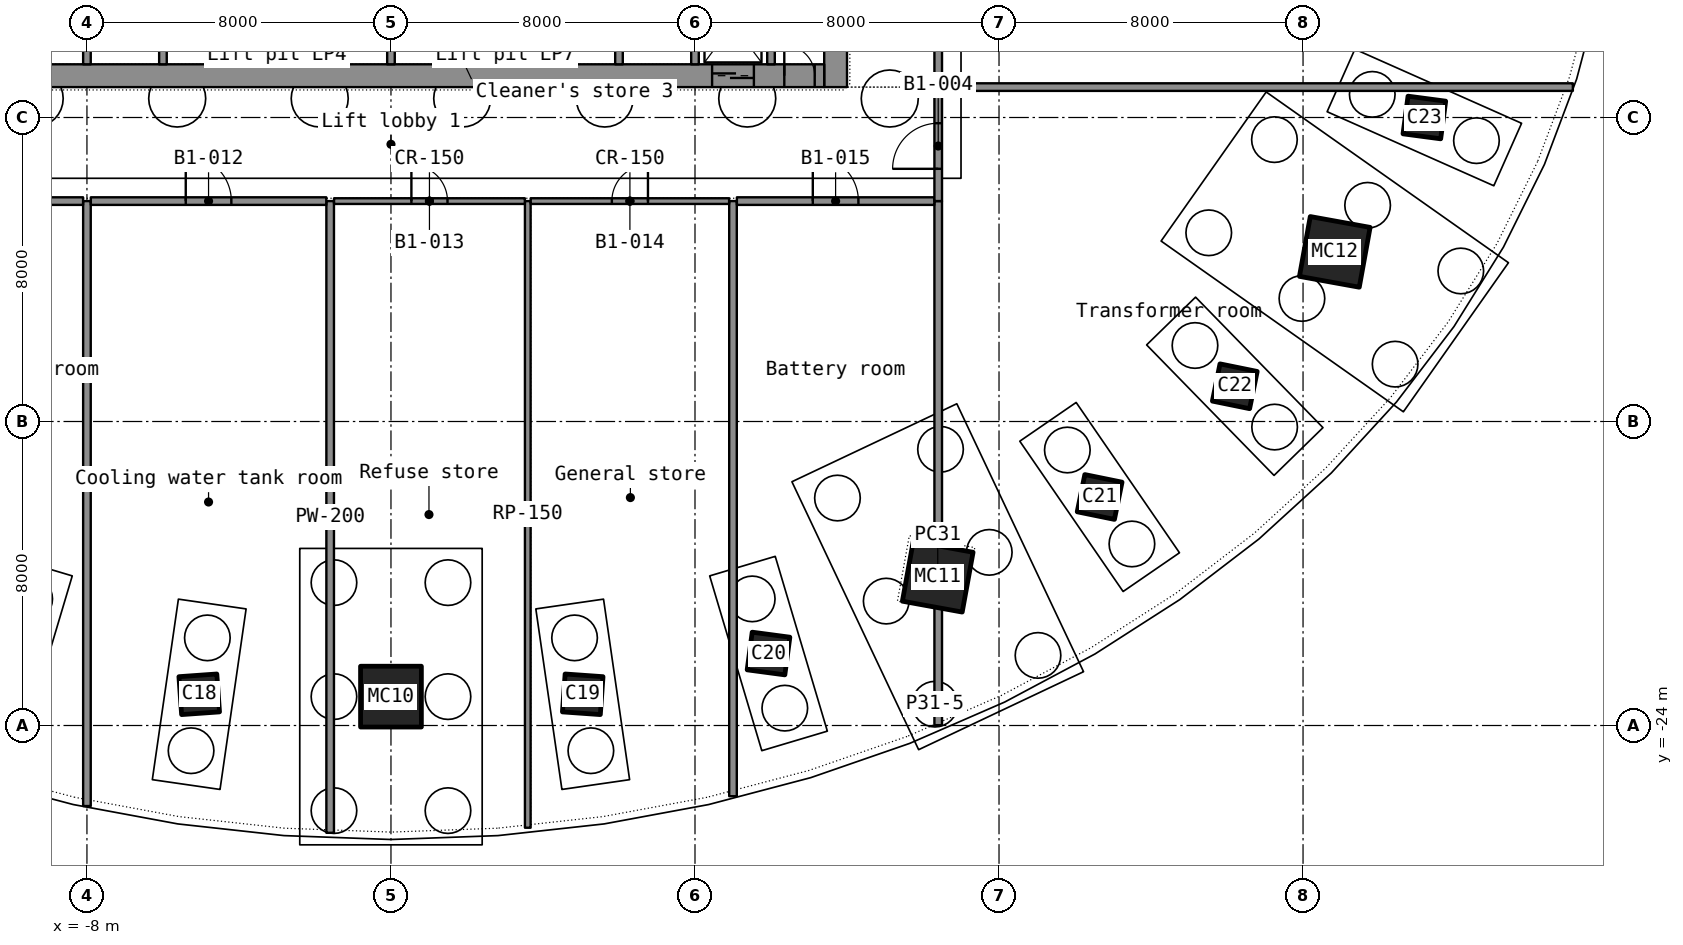
"""IFC4 building model, lengths in metres.
Left out: names, types, materials, properties, quantities, classifications, styles, units other than length and angle.
Written with IfcOpenShell. Run it as: python <this file> out.ifc"""

import sys

from ifc_helpers import new_model, si_unit, direction, frame, frame_2d, origin, origin_2d, place, context, subcontext, project, spatial, rectangle, hollow_rectangle, extrude, element, fill, save


model = new_model("IFC4")
c1 = context("Model", 3, precision=1e-05, world=origin(), true_north=direction((0.0, 1.0)))
c2 = subcontext(c1, "Body", "Model", "MODEL_VIEW")
j1 = project(units=[si_unit("LENGTHUNIT", "METRE"), si_unit("PLANEANGLEUNIT", "RADIAN")], contexts=[c1])
p1 = place(None, origin())
s1 = spatial("IfcSite", under=j1, at=p1, CompositionType="ELEMENT")
p2 = place(p1, origin())
s2 = spatial("IfcBuilding", under=s1, at=p2, CompositionType="ELEMENT")
p3 = place(p2, frame((0.0, 0.0, -5.0)))
s3 = spatial("IfcBuildingStorey", under=s2, at=p3, CompositionType="ELEMENT", Elevation=-5.0)
p4 = place(p3, frame((-5.046, -23.179, 0.0), z_axis=(0.00600341, 0.027918297, 0.999592181), x_axis=(-0.990084374, 0.140459386, 0.002023321)))
e1 = element("IfcColumn", 1, at=p4, inside=s3, PredefinedType="COLUMN", context=c2, shape_type="SweptSolid", body=[
    extrude(hollow_rectangle(XDim=1.0, YDim=1.0, WallThickness=0.032, at=origin_2d()), origin(), (0.0, 0.0, 1.0), 5.002),
])
p5 = place(p3, frame((0.0, -23.24, 0.0), z_axis=(0.0, 0.028357732, 0.999597839), x_axis=(-1.0, 0.0, 0.0)))
e2 = element("IfcColumn", 2, at=p5, inside=s3, PredefinedType="COLUMN", context=c2, shape_type="SweptSolid", body=[
    extrude(hollow_rectangle(XDim=1.6, YDim=1.6, WallThickness=0.04, at=origin_2d()), origin(), (0.0, 0.0, 1.0), 5.002),
])
p6 = place(p3, frame((5.046, -23.179, 0.0), z_axis=(-0.00600341, 0.027918297, 0.999592181), x_axis=(-0.990084374, -0.140459386, -0.002023321)))
e3 = element("IfcColumn", 3, at=p6, inside=s3, PredefinedType="COLUMN", context=c2, shape_type="SweptSolid", body=[
    extrude(hollow_rectangle(XDim=1.0, YDim=1.0, WallThickness=0.032, at=origin_2d()), origin(), (0.0, 0.0, 1.0), 5.002),
])
p7 = place(p3, frame((9.935, -22.106, 0.0), z_axis=(-0.011860186, 0.026648812, 0.999574498), x_axis=(-0.959327102, -0.282270497, -0.003857265)))
e4 = element("IfcColumn", 4, at=p7, inside=s3, PredefinedType="COLUMN", context=c2, shape_type="SweptSolid", body=[
    extrude(hollow_rectangle(XDim=1.0, YDim=1.0, WallThickness=0.032, at=origin_2d()), origin(), (0.0, 0.0, 1.0), 5.002),
])
p8 = place(p3, frame((14.387, -20.085, 0.0), z_axis=(-0.017326178, 0.02450068, 0.999549659), x_axis=(-0.906542435, -0.422080558, -0.005368072)))
e5 = element("IfcColumn", 5, at=p8, inside=s3, PredefinedType="COLUMN", context=c2, shape_type="SweptSolid", body=[
    extrude(hollow_rectangle(XDim=1.6, YDim=1.6, WallThickness=0.04, at=origin_2d()), origin(), (0.0, 0.0, 1.0), 5.002),
])
p9 = place(p3, frame((18.647, -17.986, 0.0), z_axis=(-0.022206077, 0.021718031, 0.999517492), x_axis=(-0.827946422, -0.560772827, -0.006209556)))
e6 = element("IfcColumn", 6, at=p9, inside=s3, PredefinedType="COLUMN", context=c2, shape_type="SweptSolid", body=[
    extrude(hollow_rectangle(XDim=1.0, YDim=1.0, WallThickness=0.032, at=origin_2d()), origin(), (0.0, 0.0, 1.0), 5.002),
])
p10 = place(p3, frame((22.204, -15.073, 0.0), z_axis=(-0.026451197, 0.018203499, 0.99948435), x_axis=(-0.719938809, -0.694007913, -0.006413178)))
e7 = element("IfcColumn", 7, at=p10, inside=s3, PredefinedType="COLUMN", context=c2, shape_type="SweptSolid", body=[
    extrude(hollow_rectangle(XDim=1.0, YDim=1.0, WallThickness=0.032, at=origin_2d()), origin(), (0.0, 0.0, 1.0), 5.003),
])
p11 = place(p3, frame((24.835, -11.536, 0.0), z_axis=(-0.029964003, 0.014152379, 0.999450784), x_axis=(-0.581238956, -0.813711512, -0.005903534)))
e8 = element("IfcColumn", 8, at=p11, inside=s3, PredefinedType="COLUMN", context=c2, shape_type="SweptSolid", body=[
    extrude(hollow_rectangle(XDim=1.6, YDim=1.6, WallThickness=0.04, at=origin_2d()), origin(), (0.0, 0.0, 1.0), 5.003),
])
p12 = place(p3, frame((27.192, -8.0, 0.0), z_axis=(-0.032500817, 0.009711205, 0.999424529), x_axis=(-0.409851764, -0.912141214, -0.004465096)))
e9 = element("IfcColumn", 9, at=p12, inside=s3, PredefinedType="COLUMN", context=c2, shape_type="SweptSolid", body=[
    extrude(hollow_rectangle(XDim=1.0, YDim=1.0, WallThickness=0.032, at=origin_2d()), origin(), (0.0, 0.0, 1.0), 5.003),
])
p13 = place(p3, frame((11.7, -7.2, 0.0), z_axis=(0.0, 0.0, 1.0), x_axis=(0.0, 1.0, 0.0)))
e10 = element("IfcWall", 10, at=p13, inside=s3, PredefinedType="SHEAR", context=c2, shape_type="SweptSolid", body=[
    extrude(rectangle(XDim=14.4, YDim=0.6, at=frame_2d((7.2, 0.0))), origin(), (0.0, 0.0, 1.0), 4.6),
])
p14 = place(p13, frame((6.5, 0.0, 0.0)))
e11 = element("IfcOpeningElement", 11, at=p14, cuts=e10, PredefinedType="OPENING", context=c2, shape_type="SweptSolid", body=[
    extrude(rectangle(XDim=1.4, YDim=2.2, at=frame_2d((0.7, 1.1))), frame((0.0, 0.31, 0.0), z_axis=(0.0, -1.0, 0.0), x_axis=(1.0, 0.0, 0.0)), (0.0, 0.0, 1.0), 0.62),
])
p15 = place(p3, frame((-11.4, -6.9, 0.0), z_axis=(0.0, 0.0, 1.0), x_axis=(1.0, 0.0, 0.0)))
e12 = element("IfcWall", 12, at=p15, inside=s3, PredefinedType="SHEAR", context=c2, shape_type="SweptSolid", body=[
    extrude(rectangle(XDim=22.8, YDim=0.6, at=frame_2d((11.4, 0.0))), origin(), (0.0, 0.0, 1.0), 4.6),
])
p16 = place(p15, frame((19.85, 0.0, 0.0)))
e13 = element("IfcOpeningElement", 13, at=p16, cuts=e12, PredefinedType="OPENING", context=c2, shape_type="SweptSolid", body=[
    extrude(rectangle(XDim=1.1, YDim=2.2, at=frame_2d((0.55, 1.1))), frame((0.0, 0.31, 0.0), z_axis=(0.0, -1.0, 0.0), x_axis=(1.0, 0.0, 0.0)), (0.0, 0.0, 1.0), 0.62),
])
p17 = place(p15, frame((0.25, 0.0, 0.0)))
e14 = element("IfcOpeningElement", 14, at=p17, cuts=e12, PredefinedType="OPENING", context=c2, shape_type="SweptSolid", body=[
    extrude(rectangle(XDim=0.8, YDim=2.05, at=frame_2d((0.4, 1.025))), frame((0.0, 0.31, 0.0), z_axis=(0.0, -1.0, 0.0), x_axis=(1.0, 0.0, 0.0)), (0.0, 0.0, 1.0), 0.62),
])
p18 = place(p15, frame((21.75, 0.0, 0.0)))
e15 = element("IfcOpeningElement", 15, at=p18, cuts=e12, PredefinedType="OPENING", context=c2, shape_type="SweptSolid", body=[
    extrude(rectangle(XDim=0.8, YDim=2.05, at=frame_2d((0.4, 1.025))), frame((0.0, 0.31, 0.0), z_axis=(0.0, -1.0, 0.0), x_axis=(1.0, 0.0, 0.0)), (0.0, 0.0, 1.0), 0.62),
])
for number, where, z_axis, x_axis in (
    (16, (-8.0, -6.6, 0.0), (0.0, 0.0, 1.0), (0.0, 1.0, 0.0)),
    (17, (-6.0, -6.6, 0.0), (0.0, 0.0, 1.0), (0.0, 1.0, 0.0)),
    (18, (-4.0, -6.6, 0.0), (0.0, 0.0, 1.0), (0.0, 1.0, 0.0)),
    (19, (-2.0, -6.6, 0.0), (0.0, 0.0, 1.0), (0.0, 1.0, 0.0)),
    (20, (0.0, -6.6, 0.0), (0.0, 0.0, 1.0), (0.0, 1.0, 0.0)),
    (21, (2.0, -6.6, 0.0), (0.0, 0.0, 1.0), (0.0, 1.0, 0.0)),
    (22, (4.0, -6.6, 0.0), (0.0, 0.0, 1.0), (0.0, 1.0, 0.0)),
    (23, (6.0, -6.6, 0.0), (0.0, 0.0, 1.0), (0.0, 1.0, 0.0)),
    (24, (8.0, -6.6, 0.0), (0.0, 0.0, 1.0), (0.0, 1.0, 0.0)),
    (25, (10.0, -6.6, 0.0), (0.0, 0.0, 1.0), (0.0, 1.0, 0.0)),
):
    element("IfcWall", number, at=place(p3, frame(where, z_axis=z_axis, x_axis=x_axis)), inside=s3, PredefinedType="SHEAR", context=c2, shape_type="SweptSolid", body=[
        extrude(rectangle(XDim=2.7, YDim=0.2, at=frame_2d((1.35, 0.0))), origin(), (0.0, 0.0, 1.0), 4.6),
    ])
p19 = place(p3, frame((-1.6, -26.824, 0.0), z_axis=(0.0, 0.0, 1.0), x_axis=(0.0, 1.0, 0.0)))
e26 = element("IfcWall", 26, at=p19, inside=s3, PredefinedType="PARTITIONING", context=c2, shape_type="SweptSolid", body=[
    extrude(rectangle(XDim=16.624, YDim=0.2, at=frame_2d((8.312, 0.0))), origin(), (0.0, 0.0, 1.0), 3.6),
])
p20 = place(p3, frame((31.1, -7.2, 0.0), z_axis=(0.0, 0.0, 1.0), x_axis=(-1.0, 0.0, 0.0)))
e27 = element("IfcWall", 27, at=p20, inside=s3, PredefinedType="PARTITIONING", context=c2, shape_type="SweptSolid", body=[
    extrude(rectangle(XDim=16.7, YDim=0.2, at=frame_2d((8.35, 0.0))), origin(), (0.0, 0.0, 1.0), 3.6),
])
p21 = place(p3, frame((3.6, -26.69, 0.0), z_axis=(0.0, 0.0, 1.0), x_axis=(0.0, 1.0, 0.0)))
e28 = element("IfcWall", 28, at=p21, inside=s3, PredefinedType="PARTITIONING", context=c2, shape_type="SweptSolid", body=[
    extrude(rectangle(XDim=16.49, YDim=0.15, at=frame_2d((8.245, 0.0))), origin(), (0.0, 0.0, 1.0), 3.6),
])
p22 = place(p3, frame((-8.0, -26.12, 0.0), z_axis=(0.0, 0.0, 1.0), x_axis=(0.0, 1.0, 0.0)))
e29 = element("IfcWall", 29, at=p22, inside=s3, PredefinedType="PARTITIONING", context=c2, shape_type="SweptSolid", body=[
    extrude(rectangle(XDim=15.92, YDim=0.2, at=frame_2d((7.96, 0.0))), origin(), (0.0, 0.0, 1.0), 3.6),
])
p23 = place(p3, frame((9.0, -25.861, 0.0), z_axis=(0.0, 0.0, 1.0), x_axis=(0.0, 1.0, 0.0)))
e30 = element("IfcWall", 30, at=p23, inside=s3, PredefinedType="PARTITIONING", context=c2, shape_type="SweptSolid", body=[
    extrude(rectangle(XDim=15.661, YDim=0.2, at=frame_2d((7.831, 0.0))), origin(), (0.0, 0.0, 1.0), 3.6),
])
p24 = place(p3, frame((14.4, -7.098, 0.0), z_axis=(0.0, 0.0, 1.0), x_axis=(0.0, 1.0, 0.0)))
e31 = element("IfcWall", 31, at=p24, inside=s3, PredefinedType="PARTITIONING", context=c2, shape_type="SweptSolid", body=[
    extrude(rectangle(XDim=14.196, YDim=0.2, at=frame_2d((7.098, 0.0))), origin(), (0.0, 0.0, 1.0), 3.6),
])
p25 = place(p24, frame((6.498, 0.0, 0.0)))
e32 = element("IfcOpeningElement", 32, at=p25, cuts=e31, PredefinedType="OPENING", context=c2, shape_type="SweptSolid", body=[
    extrude(rectangle(XDim=1.2, YDim=2.2, at=frame_2d((0.6, 1.1))), frame((0.0, 0.11, 0.0), z_axis=(0.0, -1.0, 0.0), x_axis=(1.0, 0.0, 0.0)), (0.0, 0.0, 1.0), 0.22),
])
p26 = place(p3, frame((14.4, -10.2, 0.0), z_axis=(0.0, 0.0, 1.0), x_axis=(0.0, -1.0, 0.0)))
e33 = element("IfcWall", 33, at=p26, inside=s3, PredefinedType="PARTITIONING", context=c2, shape_type="SweptSolid", body=[
    extrude(rectangle(XDim=13.791, YDim=0.2, at=frame_2d((6.896, 0.0))), origin(), (0.0, 0.0, 1.0), 3.6),
])
p27 = place(p3, frame((-14.298, -10.2, 0.0), z_axis=(0.0, 0.0, 1.0), x_axis=(1.0, 0.0, 0.0)))
e34 = element("IfcWall", 34, at=p27, inside=s3, PredefinedType="PARTITIONING", context=c2, shape_type="SweptSolid", body=[
    extrude(rectangle(XDim=6.196, YDim=0.2, at=frame_2d((3.098, 0.0))), origin(), (0.0, 0.0, 1.0), 3.6),
])
p28 = place(p27, frame((2.498, 0.0, 0.0)))
e35 = element("IfcOpeningElement", 35, at=p28, cuts=e34, PredefinedType="OPENING", context=c2, shape_type="SweptSolid", body=[
    extrude(rectangle(XDim=1.2, YDim=2.2, at=frame_2d((0.6, 1.1))), frame((0.0, 0.11, 0.0), z_axis=(0.0, -1.0, 0.0), x_axis=(1.0, 0.0, 0.0)), (0.0, 0.0, 1.0), 0.22),
])
p29 = place(p3, frame((-7.898, -10.2, 0.0), z_axis=(0.0, 0.0, 1.0), x_axis=(1.0, 0.0, 0.0)))
e36 = element("IfcWall", 36, at=p29, inside=s3, PredefinedType="PARTITIONING", context=c2, shape_type="SweptSolid", body=[
    extrude(rectangle(XDim=6.196, YDim=0.2, at=frame_2d((3.098, 0.0))), origin(), (0.0, 0.0, 1.0), 3.6),
])
p30 = place(p29, frame((2.498, 0.0, 0.0)))
e37 = element("IfcOpeningElement", 37, at=p30, cuts=e36, PredefinedType="OPENING", context=c2, shape_type="SweptSolid", body=[
    extrude(rectangle(XDim=1.2, YDim=2.2, at=frame_2d((0.6, 1.1))), frame((0.0, 0.11, 0.0), z_axis=(0.0, -1.0, 0.0), x_axis=(1.0, 0.0, 0.0)), (0.0, 0.0, 1.0), 0.22),
])
p31 = place(p3, frame((3.677, -10.2, 0.0), z_axis=(0.0, 0.0, 1.0), x_axis=(1.0, 0.0, 0.0)))
e38 = element("IfcWall", 38, at=p31, inside=s3, PredefinedType="PARTITIONING", context=c2, shape_type="SweptSolid", body=[
    extrude(rectangle(XDim=5.221, YDim=0.15, at=frame_2d((2.61, 0.0))), origin(), (0.0, 0.0, 1.0), 3.6),
])
p32 = place(p31, frame((2.135, 0.0, 0.0)))
e39 = element("IfcOpeningElement", 39, at=p32, cuts=e38, PredefinedType="OPENING", context=c2, shape_type="SweptSolid", body=[
    extrude(rectangle(XDim=0.95, YDim=2.15, at=frame_2d((0.475, 1.075))), frame((0.0, 0.085, 0.0), z_axis=(0.0, -1.0, 0.0), x_axis=(1.0, 0.0, 0.0)), (0.0, 0.0, 1.0), 0.17),
])
p33 = place(p3, frame((9.102, -10.2, 0.0), z_axis=(0.0, 0.0, 1.0), x_axis=(1.0, 0.0, 0.0)))
e40 = element("IfcWall", 40, at=p33, inside=s3, PredefinedType="PARTITIONING", context=c2, shape_type="SweptSolid", body=[
    extrude(rectangle(XDim=5.196, YDim=0.2, at=frame_2d((2.598, 0.0))), origin(), (0.0, 0.0, 1.0), 3.6),
])
p34 = place(p33, frame((1.998, 0.0, 0.0)))
e41 = element("IfcOpeningElement", 41, at=p34, cuts=e40, PredefinedType="OPENING", context=c2, shape_type="SweptSolid", body=[
    extrude(rectangle(XDim=1.2, YDim=2.2, at=frame_2d((0.6, 1.1))), frame((0.0, 0.11, 0.0), z_axis=(0.0, -1.0, 0.0), x_axis=(1.0, 0.0, 0.0)), (0.0, 0.0, 1.0), 0.22),
])
p35 = place(p3, frame((-1.498, -10.2, 0.0), z_axis=(0.0, 0.0, 1.0), x_axis=(1.0, 0.0, 0.0)))
e42 = element("IfcWall", 42, at=p35, inside=s3, PredefinedType="PARTITIONING", context=c2, shape_type="SweptSolid", body=[
    extrude(rectangle(XDim=5.021, YDim=0.15, at=frame_2d((2.51, 0.0))), origin(), (0.0, 0.0, 1.0), 3.6),
])
p36 = place(p35, frame((2.035, 0.0, 0.0)))
e43 = element("IfcOpeningElement", 43, at=p36, cuts=e42, PredefinedType="OPENING", context=c2, shape_type="SweptSolid", body=[
    extrude(rectangle(XDim=0.95, YDim=2.15, at=frame_2d((0.475, 1.075))), frame((0.0, 0.085, 0.0), z_axis=(0.0, -1.0, 0.0), x_axis=(1.0, 0.0, 0.0)), (0.0, 0.0, 1.0), 0.17),
])
p37 = place(p3, frame((14.4, -10.199, 0.0), z_axis=(0.0, 0.0, 1.0), x_axis=(0.0, 1.0, 0.0)))
e44 = element("IfcWall", 44, at=p37, inside=s3, PredefinedType="PARTITIONING", context=c2, shape_type="SweptSolid", body=[
    extrude(rectangle(XDim=2.897, YDim=0.2, at=frame_2d((1.448, 0.0))), origin(), (0.0, 0.0, 1.0), 3.6),
])
p38 = place(p37, frame((0.848, 0.0, 0.0)))
e45 = element("IfcOpeningElement", 45, at=p38, cuts=e44, PredefinedType="OPENING", context=c2, shape_type="SweptSolid", body=[
    extrude(rectangle(XDim=1.2, YDim=2.2, at=frame_2d((0.6, 1.1))), frame((0.0, 0.11, 0.0), z_axis=(0.0, -1.0, 0.0), x_axis=(1.0, 0.0, 0.0)), (0.0, 0.0, 1.0), 0.22),
])
p39 = place(p16, origin())
e46 = element("IfcDoor", 46, at=p39, inside=s3, OperationType="DOUBLE_DOOR_SLIDING", PredefinedType="DOOR", context=c2, shape_type="SweptSolid", body=[
    extrude(rectangle(XDim=1.1, YDim=2.2, at=frame_2d((0.55, 1.1))), frame((0.0, 0.025, 0.0), z_axis=(0.0, -1.0, 0.0), x_axis=(1.0, 0.0, 0.0)), (0.0, 0.0, 1.0), 0.05),
])
fill(e13, e46)
p40 = place(p18, origin())
e47 = element("IfcDoor", 47, at=p40, inside=s3, OperationType="SINGLE_SWING_LEFT", PredefinedType="DOOR", context=c2, shape_type="SweptSolid", body=[
    extrude(rectangle(XDim=0.8, YDim=2.05, at=frame_2d((0.4, 1.025))), frame((0.0, 0.025, 0.0), z_axis=(0.0, -1.0, 0.0), x_axis=(1.0, 0.0, 0.0)), (0.0, 0.0, 1.0), 0.05),
])
fill(e15, e47)
p41 = place(p38, origin())
e48 = element("IfcDoor", 48, at=p41, inside=s3, OperationType="DOUBLE_DOOR_SINGLE_SWING", PredefinedType="DOOR", context=c2, shape_type="SweptSolid", body=[
    extrude(rectangle(XDim=1.2, YDim=2.2, at=frame_2d((0.6, 1.1))), frame((0.0, 0.025, 0.0), z_axis=(0.0, -1.0, 0.0), x_axis=(1.0, 0.0, 0.0)), (0.0, 0.0, 1.0), 0.05),
])
fill(e45, e48)
p42 = place(p30, origin())
e49 = element("IfcDoor", 49, at=p42, inside=s3, OperationType="DOUBLE_DOOR_SINGLE_SWING", PredefinedType="DOOR", context=c2, shape_type="SweptSolid", body=[
    extrude(rectangle(XDim=1.2, YDim=2.2, at=frame_2d((0.6, 1.1))), frame((0.0, 0.025, 0.0), z_axis=(0.0, -1.0, 0.0), x_axis=(1.0, 0.0, 0.0)), (0.0, 0.0, 1.0), 0.05),
])
fill(e37, e49)
p43 = place(p36, origin())
e50 = element("IfcDoor", 50, at=p43, inside=s3, OperationType="SINGLE_SWING_LEFT", PredefinedType="DOOR", context=c2, shape_type="SweptSolid", body=[
    extrude(rectangle(XDim=0.95, YDim=2.15, at=frame_2d((0.475, 1.075))), frame((0.0, 0.025, 0.0), z_axis=(0.0, -1.0, 0.0), x_axis=(1.0, 0.0, 0.0)), (0.0, 0.0, 1.0), 0.05),
])
fill(e43, e50)
p44 = place(p32, origin())
e51 = element("IfcDoor", 51, at=p44, inside=s3, OperationType="SINGLE_SWING_RIGHT", PredefinedType="DOOR", context=c2, shape_type="SweptSolid", body=[
    extrude(rectangle(XDim=0.95, YDim=2.15, at=frame_2d((0.475, 1.075))), frame((0.0, 0.025, 0.0), z_axis=(0.0, -1.0, 0.0), x_axis=(1.0, 0.0, 0.0)), (0.0, 0.0, 1.0), 0.05),
])
fill(e39, e51)
p45 = place(p34, origin())
e52 = element("IfcDoor", 52, at=p45, inside=s3, OperationType="DOUBLE_DOOR_SINGLE_SWING", PredefinedType="DOOR", context=c2, shape_type="SweptSolid", body=[
    extrude(rectangle(XDim=1.2, YDim=2.2, at=frame_2d((0.6, 1.1))), frame((0.0, 0.025, 0.0), z_axis=(0.0, -1.0, 0.0), x_axis=(1.0, 0.0, 0.0)), (0.0, 0.0, 1.0), 0.05),
])
fill(e41, e52)
save(model, sys.argv[1])
